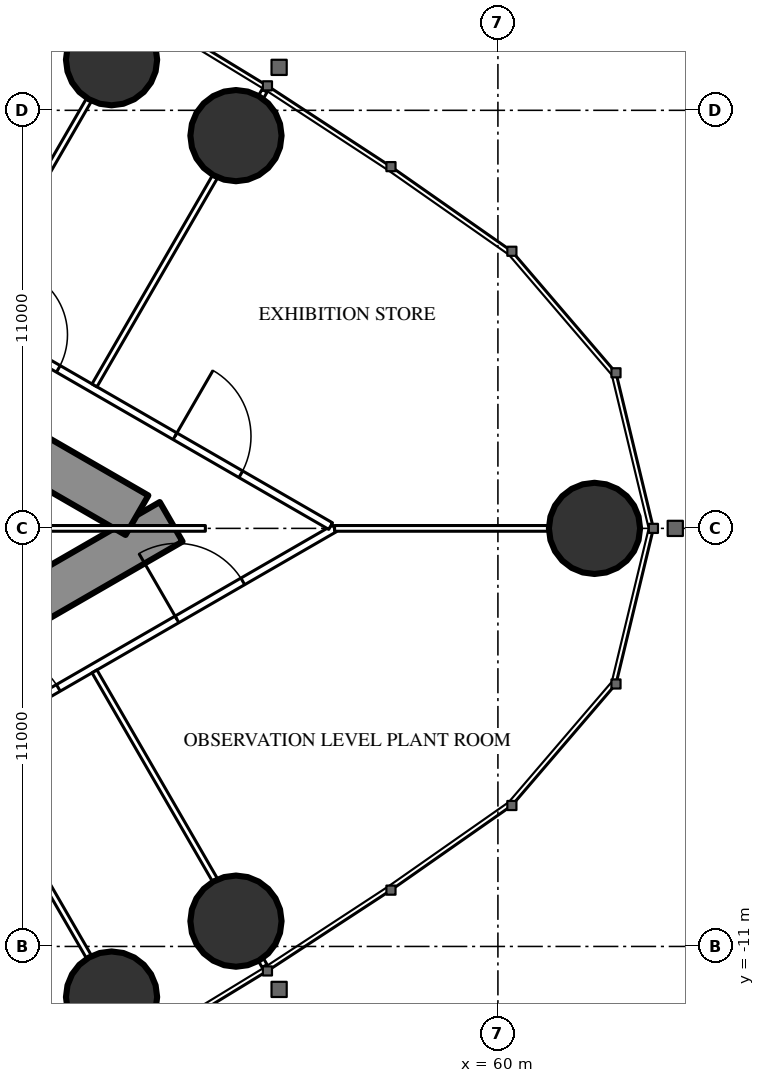
"""IFC4 building model, lengths in metres.
Left out: names, types, materials, properties, quantities, classifications, styles, units other than length and angle.
Written with IfcOpenShell. Run it as: python <this file> out.ifc"""

import sys

from ifc_helpers import new_model, si_unit, direction, frame, frame_2d, origin, origin_2d, place, context, subcontext, project, spatial, rectangle, circle, extrude, element, fill, save


model = new_model("IFC4")
c1 = context("Model", 3, precision=1e-05, world=origin(), true_north=direction((0.0, 1.0)))
c2 = subcontext(c1, "Body", "Model", "MODEL_VIEW")
j1 = project(units=[si_unit("LENGTHUNIT", "METRE"), si_unit("PLANEANGLEUNIT", "RADIAN")], contexts=[c1])
p1 = place(None, origin())
s1 = spatial("IfcSite", under=j1, at=p1, CompositionType="ELEMENT")
p2 = place(p1, origin())
s2 = spatial("IfcBuilding", under=s1, at=p2, CompositionType="ELEMENT")
p3 = place(p2, frame((0.0, 0.0, 257.3)))
s3 = spatial("IfcBuildingStorey", under=s2, at=p3, CompositionType="ELEMENT", Elevation=257.3)
for number, where, z_axis, x_axis in (
    (1, (62.542, 0.0, 0.0), (0.0, 0.0, 1.0), (1.0, 0.0, 0.0)),
    (2, (53.108, 10.334, 0.0), (0.0, 0.0, 1.0), (1.0, 0.0, 0.0)),
    (3, (49.834, 12.332, 0.0), (0.0, 0.0, 1.0), (1.0, 0.0, 0.0)),
    (4, (49.834, -12.332, 0.0), (0.0, 0.0, 1.0), (1.0, 0.0, 0.0)),
    (5, (53.108, -10.334, 0.0), (0.0, 0.0, 1.0), (1.0, 0.0, 0.0)),
):
    element("IfcColumn", number, at=place(p3, frame(where, z_axis=z_axis, x_axis=x_axis)), inside=s3, PredefinedType="COLUMN", context=c2, shape_type="SweptSolid", body=[
        extrude(circle(Radius=1.2, at=origin_2d()), origin(), (0.0, 0.0, 1.0), 6.0),
    ])
p4 = place(p3, frame((27.2, -13.8, 0.0), z_axis=(0.0, 0.0, 1.0), x_axis=(0.866027159892, 0.499996958321, 0.0)))
e6 = element("IfcWall", 6, at=p4, inside=s3, PredefinedType="SHEAR", context=c2, shape_type="SweptSolid", body=[
    extrude(rectangle(XDim=27.947, YDim=1.2, at=frame_2d((13.973, 0.0))), origin(), (0.0, 0.0, 1.0), 6.0),
])
p5 = place(p4, frame((4.6, 0.0, 0.0)))
e7 = element("IfcOpeningElement", 7, at=p5, cuts=e6, PredefinedType="OPENING", context=c2, shape_type="SweptSolid", body=[
    extrude(rectangle(XDim=1.0, YDim=2.2, at=frame_2d((0.5, 1.1))), frame((0.0, 0.61, 0.0), z_axis=(0.0, -1.0, 0.0), x_axis=(1.0, 0.0, 0.0)), (0.0, 0.0, 1.0), 1.22),
])
p6 = place(p4, frame((13.395, 0.0, 0.0)))
e8 = element("IfcOpeningElement", 8, at=p6, cuts=e6, PredefinedType="OPENING", context=c2, shape_type="SweptSolid", body=[
    extrude(rectangle(XDim=1.8, YDim=2.2, at=frame_2d((0.9, 1.1))), frame((0.0, 0.61, 0.0), z_axis=(0.0, -1.0, 0.0), x_axis=(1.0, 0.0, 0.0)), (0.0, 0.0, 1.0), 1.22),
])
p7 = place(p3, frame((27.2, 13.8, 0.0), z_axis=(0.0, 0.0, 1.0), x_axis=(0.866024515034, -0.500001539357, 0.0)))
e9 = element("IfcWall", 9, at=p7, inside=s3, PredefinedType="SHEAR", context=c2, shape_type="SweptSolid", body=[
    extrude(rectangle(XDim=26.907, YDim=1.2, at=frame_2d((13.454, 0.0))), origin(), (0.0, 0.0, 1.0), 6.0),
])
p8 = place(p7, frame((4.6, 0.0, 0.0)))
e10 = element("IfcOpeningElement", 10, at=p8, cuts=e9, PredefinedType="OPENING", context=c2, shape_type="SweptSolid", body=[
    extrude(rectangle(XDim=1.0, YDim=2.2, at=frame_2d((0.5, 1.1))), frame((0.0, 0.61, 0.0), z_axis=(0.0, -1.0, 0.0), x_axis=(1.0, 0.0, 0.0)), (0.0, 0.0, 1.0), 1.22),
])
p9 = place(p7, frame((13.395, 0.0, 0.0)))
e11 = element("IfcOpeningElement", 11, at=p9, cuts=e9, PredefinedType="OPENING", context=c2, shape_type="SweptSolid", body=[
    extrude(rectangle(XDim=1.8, YDim=2.2, at=frame_2d((0.9, 1.1))), frame((0.0, 0.61, 0.0), z_axis=(0.0, -1.0, 0.0), x_axis=(1.0, 0.0, 0.0)), (0.0, 0.0, 1.0), 1.22),
])
p10 = place(p3, frame((28.907, -15.47, 0.0), z_axis=(0.0, 0.0, 1.0), x_axis=(0.866023700353, 0.500002950419, 0.0)))
e12 = element("IfcWall", 12, at=p10, inside=s3, PredefinedType="PARTITIONING", context=c2, shape_type="SweptSolid", body=[
    extrude(rectangle(XDim=30.941, YDim=0.2, at=frame_2d((15.47, 0.0))), origin(), (0.0, 0.0, 1.0), 5.75),
])
p11 = place(p10, frame((7.024, 0.0, 0.0)))
e13 = element("IfcOpeningElement", 13, at=p11, cuts=e12, PredefinedType="OPENING", context=c2, shape_type="SweptSolid", body=[
    extrude(rectangle(XDim=2.0, YDim=2.4, at=frame_2d((1.0, 1.2))), frame((0.0, 0.11, 0.0), z_axis=(0.0, -1.0, 0.0), x_axis=(1.0, 0.0, 0.0)), (0.0, 0.0, 1.0), 0.22),
])
p12 = place(p10, frame((16.865, 0.0, 0.0)))
e14 = element("IfcOpeningElement", 14, at=p12, cuts=e12, PredefinedType="OPENING", context=c2, shape_type="SweptSolid", body=[
    extrude(rectangle(XDim=1.8, YDim=2.2, at=frame_2d((0.9, 1.1))), frame((0.0, 0.11, 0.0), z_axis=(0.0, -1.0, 0.0), x_axis=(1.0, 0.0, 0.0)), (0.0, 0.0, 1.0), 0.22),
])
p13 = place(p10, frame((20.748, 0.0, 0.0)))
e15 = element("IfcOpeningElement", 15, at=p13, cuts=e12, PredefinedType="OPENING", context=c2, shape_type="SweptSolid", body=[
    extrude(rectangle(XDim=1.8, YDim=2.2, at=frame_2d((0.9, 1.1))), frame((0.0, 0.11, 0.0), z_axis=(0.0, -1.0, 0.0), x_axis=(1.0, 0.0, 0.0)), (0.0, 0.0, 1.0), 0.22),
])
p14 = place(p10, frame((26.152, 0.0, 0.0)))
e16 = element("IfcOpeningElement", 16, at=p14, cuts=e12, PredefinedType="OPENING", context=c2, shape_type="SweptSolid", body=[
    extrude(rectangle(XDim=2.0, YDim=2.4, at=frame_2d((1.0, 1.2))), frame((0.0, 0.11, 0.0), z_axis=(0.0, -1.0, 0.0), x_axis=(1.0, 0.0, 0.0)), (0.0, 0.0, 1.0), 0.22),
])
p15 = place(p3, frame((28.907, 15.47, 0.0), z_axis=(0.0, 0.0, 1.0), x_axis=(0.866025841386, -0.499999242051, 0.0)))
e17 = element("IfcWall", 17, at=p15, inside=s3, PredefinedType="PARTITIONING", context=c2, shape_type="SweptSolid", body=[
    extrude(rectangle(XDim=30.821, YDim=0.2, at=frame_2d((15.41, 0.0))), origin(), (0.0, 0.0, 1.0), 5.75),
])
p16 = place(p15, frame((26.092, 0.0, 0.0)))
e18 = element("IfcOpeningElement", 18, at=p16, cuts=e17, PredefinedType="OPENING", context=c2, shape_type="SweptSolid", body=[
    extrude(rectangle(XDim=2.0, YDim=2.4, at=frame_2d((1.0, 1.2))), frame((0.0, 0.11, 0.0), z_axis=(0.0, -1.0, 0.0), x_axis=(1.0, 0.0, 0.0)), (0.0, 0.0, 1.0), 0.22),
])
p17 = place(p15, frame((20.748, 0.0, 0.0)))
e19 = element("IfcOpeningElement", 19, at=p17, cuts=e17, PredefinedType="OPENING", context=c2, shape_type="SweptSolid", body=[
    extrude(rectangle(XDim=1.8, YDim=2.2, at=frame_2d((0.9, 1.1))), frame((0.0, 0.11, 0.0), z_axis=(0.0, -1.0, 0.0), x_axis=(1.0, 0.0, 0.0)), (0.0, 0.0, 1.0), 0.22),
])
p18 = place(p15, frame((16.865, 0.0, 0.0)))
e20 = element("IfcOpeningElement", 20, at=p18, cuts=e17, PredefinedType="OPENING", context=c2, shape_type="SweptSolid", body=[
    extrude(rectangle(XDim=1.8, YDim=2.2, at=frame_2d((0.9, 1.1))), frame((0.0, 0.11, 0.0), z_axis=(0.0, -1.0, 0.0), x_axis=(1.0, 0.0, 0.0)), (0.0, 0.0, 1.0), 0.22),
])
p19 = place(p15, frame((7.024, 0.0, 0.0)))
e21 = element("IfcOpeningElement", 21, at=p19, cuts=e17, PredefinedType="OPENING", context=c2, shape_type="SweptSolid", body=[
    extrude(rectangle(XDim=2.0, YDim=2.4, at=frame_2d((1.0, 1.2))), frame((0.0, 0.11, 0.0), z_axis=(0.0, -1.0, 0.0), x_axis=(1.0, 0.0, 0.0)), (0.0, 0.0, 1.0), 0.22),
])
p20 = place(p3, frame((46.023, -5.704, 0.0), z_axis=(0.0, 0.0, 1.0), x_axis=(0.499984478165, -0.866034365135, 0.0)))
e22 = element("IfcWall", 22, at=p20, inside=s3, PredefinedType="PARTITIONING", context=c2, shape_type="SweptSolid", body=[
    extrude(rectangle(XDim=6.426, YDim=0.15, at=frame_2d((3.213, 0.0))), origin(), (0.0, 0.0, 1.0), 4.85),
])
p21 = place(p3, frame((49.385, -3.763, 0.0), z_axis=(0.0, 0.0, 1.0), x_axis=(0.499999447814, -0.866025722589, 0.0)))
e23 = element("IfcWall", 23, at=p21, inside=s3, PredefinedType="PARTITIONING", context=c2, shape_type="SweptSolid", body=[
    extrude(rectangle(XDim=6.333, YDim=0.15, at=frame_2d((3.166, 0.0))), origin(), (0.0, 0.0, 1.0), 4.85),
])
p22 = place(p3, frame((53.771, -11.36, 0.0), z_axis=(0.0, 0.0, 1.0), x_axis=(0.499524978789, -0.866299483762, 0.0)))
e24 = element("IfcWall", 24, at=p22, inside=s3, PredefinedType="PARTITIONING", context=c2, shape_type="SweptSolid", body=[
    extrude(rectangle(XDim=0.178, YDim=0.15, at=frame_2d((0.089, 0.0))), origin(), (0.0, 0.0, 1.0), 4.85),
])
p23 = place(p3, frame((46.023, 5.704, 0.0), z_axis=(0.0, 0.0, 1.0), x_axis=(0.499984478165, 0.866034365135, 0.0)))
e25 = element("IfcWall", 25, at=p23, inside=s3, PredefinedType="PARTITIONING", context=c2, shape_type="SweptSolid", body=[
    extrude(rectangle(XDim=6.426, YDim=0.15, at=frame_2d((3.213, 0.0))), origin(), (0.0, 0.0, 1.0), 4.85),
])
p24 = place(p3, frame((49.385, 3.763, 0.0), z_axis=(0.0, 0.0, 1.0), x_axis=(0.499999447814, 0.866025722589, 0.0)))
e26 = element("IfcWall", 26, at=p24, inside=s3, PredefinedType="PARTITIONING", context=c2, shape_type="SweptSolid", body=[
    extrude(rectangle(XDim=6.333, YDim=0.15, at=frame_2d((3.166, 0.0))), origin(), (0.0, 0.0, 1.0), 4.85),
])
p25 = place(p3, frame((53.771, 11.36, 0.0), z_axis=(0.0, 0.0, 1.0), x_axis=(0.499524978789, 0.866299483762, 0.0)))
e27 = element("IfcWall", 27, at=p25, inside=s3, PredefinedType="PARTITIONING", context=c2, shape_type="SweptSolid", body=[
    extrude(rectangle(XDim=0.178, YDim=0.15, at=frame_2d((0.089, 0.0))), origin(), (0.0, 0.0, 1.0), 4.85),
])
p26 = place(p3, frame((55.702, 0.0, 0.0), z_axis=(0.0, 0.0, 1.0), x_axis=(1.0, 0.0, 0.0)))
e28 = element("IfcWall", 28, at=p26, inside=s3, PredefinedType="PARTITIONING", context=c2, shape_type="SweptSolid", body=[
    extrude(rectangle(XDim=5.619, YDim=0.15, at=frame_2d((2.81, 0.0))), origin(), (0.0, 0.0, 1.0), 4.85),
])
p27 = place(p3, frame((44.575, 0.0, 0.0), z_axis=(0.0, 0.0, 1.0), x_axis=(1.0, 0.0, 0.0)))
e29 = element("IfcWall", 29, at=p27, inside=s3, PredefinedType="PARTITIONING", context=c2, shape_type="SweptSolid", body=[
    extrude(rectangle(XDim=7.727, YDim=0.15, at=frame_2d((3.864, 0.0))), origin(), (0.0, 0.0, 1.0), 4.85),
])
p28 = place(p13, origin())
e30 = element("IfcDoor", 30, at=p28, inside=s3, OperationType="DOUBLE_DOOR_SINGLE_SWING", PredefinedType="DOOR", context=c2, shape_type="SweptSolid", body=[
    extrude(rectangle(XDim=1.8, YDim=2.2, at=frame_2d((0.9, 1.1))), frame((0.0, 0.025, 0.0), z_axis=(0.0, -1.0, 0.0), x_axis=(1.0, 0.0, 0.0)), (0.0, 0.0, 1.0), 0.05),
])
fill(e15, e30)
p29 = place(p14, origin())
e31 = element("IfcDoor", 31, at=p29, inside=s3, OperationType="DOUBLE_DOOR_SINGLE_SWING", PredefinedType="DOOR", context=c2, shape_type="SweptSolid", body=[
    extrude(rectangle(XDim=2.0, YDim=2.4, at=frame_2d((1.0, 1.2))), frame((0.0, 0.025, 0.0), z_axis=(0.0, -1.0, 0.0), x_axis=(1.0, 0.0, 0.0)), (0.0, 0.0, 1.0), 0.05),
])
fill(e16, e31)
p30 = place(p16, origin())
e32 = element("IfcDoor", 32, at=p30, inside=s3, OperationType="DOUBLE_DOOR_SINGLE_SWING", PredefinedType="DOOR", context=c2, shape_type="SweptSolid", body=[
    extrude(rectangle(XDim=2.0, YDim=2.4, at=frame_2d((1.0, 1.2))), frame((0.0, 0.025, 0.0), z_axis=(0.0, -1.0, 0.0), x_axis=(1.0, 0.0, 0.0)), (0.0, 0.0, 1.0), 0.05),
])
fill(e18, e32)
p31 = place(p17, origin())
e33 = element("IfcDoor", 33, at=p31, inside=s3, OperationType="DOUBLE_DOOR_SINGLE_SWING", PredefinedType="DOOR", context=c2, shape_type="SweptSolid", body=[
    extrude(rectangle(XDim=1.8, YDim=2.2, at=frame_2d((0.9, 1.1))), frame((0.0, 0.025, 0.0), z_axis=(0.0, -1.0, 0.0), x_axis=(1.0, 0.0, 0.0)), (0.0, 0.0, 1.0), 0.05),
])
fill(e19, e33)
save(model, sys.argv[1])
